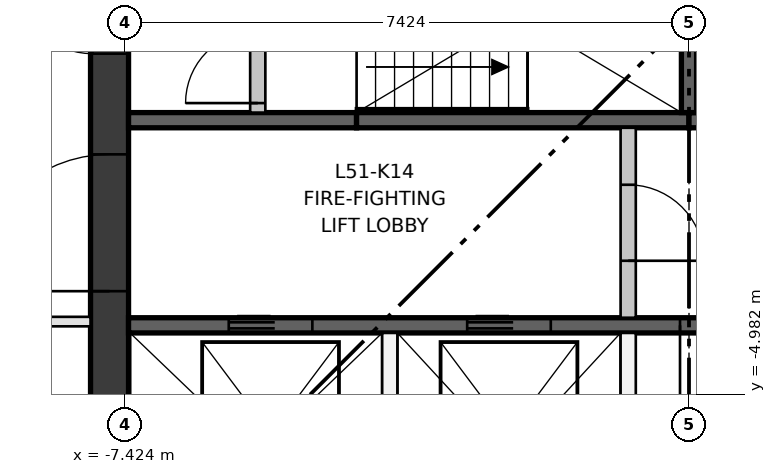
"""IFC4 building model, lengths in metres.
Left out: names, types, materials, properties, quantities, classifications, styles, units other than length and angle.
Written with IfcOpenShell. Run it as: python <this file> out.ifc"""

import sys

from ifc_helpers import new_model, si_unit, direction, frame, frame_2d, origin, place, context, subcontext, project, spatial, rectangle, extrude, element, fill, save


model = new_model("IFC4")
c1 = context("Model", 3, precision=1e-05, world=origin(), true_north=direction((0.0, 1.0)))
c2 = subcontext(c1, "Body", "Model", "MODEL_VIEW")
j1 = project(units=[si_unit("LENGTHUNIT", "METRE"), si_unit("PLANEANGLEUNIT", "RADIAN")], contexts=[c1])
p1 = place(None, origin())
s1 = spatial("IfcSite", under=j1, at=p1, CompositionType="ELEMENT")
p2 = place(p1, origin())
s2 = spatial("IfcBuilding", under=s1, at=p2, CompositionType="ELEMENT")
p3 = place(p2, frame((0.0, 0.0, 191.0)))
s3 = spatial("IfcBuildingStorey", under=s2, at=p3, CompositionType="ELEMENT", Elevation=191.0)
p4 = place(p3, frame((-7.624, -7.374, 0.0), z_axis=(0.0, 0.0, 1.0), x_axis=(0.0, 1.0, 0.0)))
e1 = element("IfcWall", 1, at=p4, inside=s3, PredefinedType="SHEAR", context=c2, shape_type="SweptSolid", body=[
    extrude(rectangle(XDim=14.748, YDim=0.5, at=frame_2d((7.374, 0.0))), origin(), (0.0, 0.0, 1.0), 3.35),
])
p5 = place(p4, frame((6.874, 0.0, 0.0)))
e2 = element("IfcOpeningElement", 2, at=p5, cuts=e1, PredefinedType="OPENING", context=c2, shape_type="SweptSolid", body=[
    extrude(rectangle(XDim=1.0, YDim=2.1, at=frame_2d((0.5, 1.05))), frame((0.0, 0.26, 0.0), z_axis=(0.0, -1.0, 0.0), x_axis=(1.0, 0.0, 0.0)), (0.0, 0.0, 1.0), 0.52),
])
p6 = place(p4, frame((3.75, 0.0, 0.0)))
e3 = element("IfcOpeningElement", 3, at=p6, cuts=e1, PredefinedType="OPENING", context=c2, shape_type="SweptSolid", body=[
    extrude(rectangle(XDim=1.8, YDim=2.1, at=frame_2d((0.9, 1.05))), frame((0.0, 0.26, 0.0), z_axis=(0.0, -1.0, 0.0), x_axis=(1.0, 0.0, 0.0)), (0.0, 0.0, 1.0), 0.52),
])
p7 = place(p4, frame((9.198, 0.0, 0.0)))
e4 = element("IfcOpeningElement", 4, at=p7, cuts=e1, PredefinedType="OPENING", context=c2, shape_type="SweptSolid", body=[
    extrude(rectangle(XDim=1.8, YDim=2.1, at=frame_2d((0.9, 1.05))), frame((0.0, 0.26, 0.0), z_axis=(0.0, -1.0, 0.0), x_axis=(1.0, 0.0, 0.0)), (0.0, 0.0, 1.0), 0.52),
])
p8 = place(p3, frame((-7.374, -4.074, 0.0), z_axis=(0.0, 0.0, 1.0), x_axis=(1.0, 0.0, 0.0)))
e5 = element("IfcWall", 5, at=p8, inside=s3, PredefinedType="SHEAR", context=c2, shape_type="SweptSolid", body=[
    extrude(rectangle(XDim=14.748, YDim=0.2, at=frame_2d((7.374, 0.0))), origin(), (0.0, 0.0, 1.0), 3.0),
])
p9 = place(p8, frame((1.319, 0.0, 0.0)))
e6 = element("IfcOpeningElement", 6, at=p9, cuts=e5, PredefinedType="OPENING", context=c2, shape_type="SweptSolid", body=[
    extrude(rectangle(XDim=1.1, YDim=2.1, at=frame_2d((0.55, 1.05))), frame((0.0, 0.11, 0.0), z_axis=(0.0, -1.0, 0.0), x_axis=(1.0, 0.0, 0.0)), (0.0, 0.0, 1.0), 0.22),
])
p10 = place(p8, frame((4.456, 0.0, 0.0)))
e7 = element("IfcOpeningElement", 7, at=p10, cuts=e5, PredefinedType="OPENING", context=c2, shape_type="SweptSolid", body=[
    extrude(rectangle(XDim=1.1, YDim=2.1, at=frame_2d((0.55, 1.05))), frame((0.0, 0.11, 0.0), z_axis=(0.0, -1.0, 0.0), x_axis=(1.0, 0.0, 0.0)), (0.0, 0.0, 1.0), 0.22),
])
p11 = place(p8, frame((7.256, 0.0, 0.0)))
e8 = element("IfcOpeningElement", 8, at=p11, cuts=e5, PredefinedType="OPENING", context=c2, shape_type="SweptSolid", body=[
    extrude(rectangle(XDim=1.0, YDim=2.1, at=frame_2d((0.5, 1.05))), frame((0.0, 0.11, 0.0), z_axis=(0.0, -1.0, 0.0), x_axis=(1.0, 0.0, 0.0)), (0.0, 0.0, 1.0), 0.22),
])
p12 = place(p8, frame((9.275, 0.0, 0.0)))
e9 = element("IfcOpeningElement", 9, at=p12, cuts=e5, PredefinedType="OPENING", context=c2, shape_type="SweptSolid", body=[
    extrude(rectangle(XDim=1.0, YDim=2.1, at=frame_2d((0.5, 1.05))), frame((0.0, 0.11, 0.0), z_axis=(0.0, -1.0, 0.0), x_axis=(1.0, 0.0, 0.0)), (0.0, 0.0, 1.0), 0.22),
])
p13 = place(p8, frame((10.95, 0.0, 0.0)))
e10 = element("IfcOpeningElement", 10, at=p13, cuts=e5, PredefinedType="OPENING", context=c2, shape_type="SweptSolid", body=[
    extrude(rectangle(XDim=1.0, YDim=2.1, at=frame_2d((0.5, 1.05))), frame((0.0, 0.11, 0.0), z_axis=(0.0, -1.0, 0.0), x_axis=(1.0, 0.0, 0.0)), (0.0, 0.0, 1.0), 0.22),
])
p14 = place(p8, frame((13.068, 0.0, 0.0)))
e11 = element("IfcOpeningElement", 11, at=p14, cuts=e5, PredefinedType="OPENING", context=c2, shape_type="SweptSolid", body=[
    extrude(rectangle(XDim=1.0, YDim=2.1, at=frame_2d((0.5, 1.05))), frame((0.0, 0.11, 0.0), z_axis=(0.0, -1.0, 0.0), x_axis=(1.0, 0.0, 0.0)), (0.0, 0.0, 1.0), 0.22),
])
p15 = place(p3, frame((-7.374, -1.375, 0.0), z_axis=(0.0, 0.0, 1.0), x_axis=(1.0, 0.0, 0.0)))
e12 = element("IfcWall", 12, at=p15, inside=s3, PredefinedType="SHEAR", context=c2, shape_type="SweptSolid", body=[
    extrude(rectangle(XDim=3.0, YDim=0.2, at=frame_2d((1.5, 0.0))), origin(), (0.0, 0.0, 1.0), 3.0),
])
for number, where, z_axis, x_axis in (
    (13, (-4.374, -1.375, 0.0), (0.0, 0.0, 1.0), (1.0, 0.0, 0.0)),
    (14, (0.0, -1.375, 0.0), (0.0, 0.0, 1.0), (1.0, 0.0, 0.0)),
):
    element("IfcWall", number, at=place(p3, frame(where, z_axis=z_axis, x_axis=x_axis)), inside=s3, PredefinedType="SHEAR", context=c2, shape_type="SweptSolid", body=[
        extrude(rectangle(XDim=4.374, YDim=0.2, at=frame_2d((2.187, 0.0))), origin(), (0.0, 0.0, 1.0), 3.0),
    ])
p16 = place(p3, frame((0.0, -1.275, 0.0), z_axis=(0.0, 0.0, 1.0), x_axis=(0.0, 1.0, 0.0)))
e15 = element("IfcWall", 15, at=p16, inside=s3, PredefinedType="SHEAR", context=c2, shape_type="SweptSolid", body=[
    extrude(rectangle(XDim=2.55, YDim=0.2, at=frame_2d((1.275, 0.0))), origin(), (0.0, 0.0, 1.0), 3.0),
])
for number, where, z_axis, x_axis in (
    (16, (-3.937, -7.374, 0.0), (0.0, 0.0, 1.0), (0.0, 1.0, 0.0)),
    (17, (-0.8, -7.374, 0.0), (0.0, 0.0, 1.0), (0.0, 1.0, 0.0)),
):
    element("IfcWall", number, at=place(p3, frame(where, z_axis=z_axis, x_axis=x_axis)), inside=s3, PredefinedType="PARTITIONING", context=c2, shape_type="SweptSolid", body=[
        extrude(rectangle(XDim=3.2, YDim=0.2, at=frame_2d((1.6, 0.0))), origin(), (0.0, 0.0, 1.0), 3.0),
    ])
p17 = place(p3, frame((-0.8, -3.974, 0.0), z_axis=(0.0, 0.0, 1.0), x_axis=(0.0, 1.0, 0.0)))
e18 = element("IfcWall", 18, at=p17, inside=s3, PredefinedType="PARTITIONING", context=c2, shape_type="SweptSolid", body=[
    extrude(rectangle(XDim=2.499, YDim=0.2, at=frame_2d((1.25, 0.0))), origin(), (0.0, 0.0, 1.0), 3.0),
])
p18 = place(p17, frame((0.75, 0.0, 0.0)))
e19 = element("IfcOpeningElement", 19, at=p18, cuts=e18, PredefinedType="OPENING", context=c2, shape_type="SweptSolid", body=[
    extrude(rectangle(XDim=1.0, YDim=2.1, at=frame_2d((0.5, 1.05))), frame((0.0, 0.11, 0.0), z_axis=(0.0, -1.0, 0.0), x_axis=(1.0, 0.0, 0.0)), (0.0, 0.0, 1.0), 0.22),
])
p19 = place(p3, frame((-5.674, -1.275, 0.0), z_axis=(0.0, 0.0, 1.0), x_axis=(0.0, 1.0, 0.0)))
e20 = element("IfcWall", 20, at=p19, inside=s3, PredefinedType="PARTITIONING", context=c2, shape_type="SweptSolid", body=[
    extrude(rectangle(XDim=2.55, YDim=0.2, at=frame_2d((1.275, 0.0))), origin(), (0.0, 0.0, 1.0), 3.0),
])
p20 = place(p19, frame((0.125, 0.0, 0.0)))
e21 = element("IfcOpeningElement", 21, at=p20, cuts=e20, PredefinedType="OPENING", context=c2, shape_type="SweptSolid", body=[
    extrude(rectangle(XDim=0.95, YDim=2.1, at=frame_2d((0.475, 1.05))), frame((0.0, 0.11, 0.0), z_axis=(0.0, -1.0, 0.0), x_axis=(1.0, 0.0, 0.0)), (0.0, 0.0, 1.0), 0.22),
])
p21 = place(p19, frame((1.475, 0.0, 0.0)))
e22 = element("IfcOpeningElement", 22, at=p21, cuts=e20, PredefinedType="OPENING", context=c2, shape_type="SweptSolid", body=[
    extrude(rectangle(XDim=0.95, YDim=2.1, at=frame_2d((0.475, 1.05))), frame((0.0, 0.11, 0.0), z_axis=(0.0, -1.0, 0.0), x_axis=(1.0, 0.0, 0.0)), (0.0, 0.0, 1.0), 0.22),
])
p22 = place(p3, frame((-7.874, -4.024, 0.0), z_axis=(0.0, 0.0, 1.0), x_axis=(-1.0, 0.0, 0.0)))
e23 = element("IfcWall", 23, at=p22, inside=s3, PredefinedType="PARTITIONING", context=c2, shape_type="SweptSolid", body=[
    extrude(rectangle(XDim=3.213, YDim=0.125, at=frame_2d((1.606, 0.0))), origin(), (0.0, 0.0, 1.0), 3.0),
])
p23 = place(p22, frame((1.1, 0.0, 0.0)))
e24 = element("IfcOpeningElement", 24, at=p23, cuts=e23, PredefinedType="OPENING", context=c2, shape_type="SweptSolid", body=[
    extrude(rectangle(XDim=1.0, YDim=2.1, at=frame_2d((0.5, 1.05))), frame((0.0, 0.073, 0.0), z_axis=(0.0, -1.0, 0.0), x_axis=(1.0, 0.0, 0.0)), (0.0, 0.0, 1.0), 0.145),
])
p24 = place(p9, origin())
e25 = element("IfcDoor", 25, at=p24, inside=s3, OperationType="DOUBLE_DOOR_SLIDING", PredefinedType="DOOR", context=c2, shape_type="SweptSolid", body=[
    extrude(rectangle(XDim=1.1, YDim=2.1, at=frame_2d((0.55, 1.05))), frame((0.0, 0.025, 0.0), z_axis=(0.0, -1.0, 0.0), x_axis=(1.0, 0.0, 0.0)), (0.0, 0.0, 1.0), 0.05),
])
fill(e6, e25)
p25 = place(p10, origin())
e26 = element("IfcDoor", 26, at=p25, inside=s3, OperationType="DOUBLE_DOOR_SLIDING", PredefinedType="DOOR", context=c2, shape_type="SweptSolid", body=[
    extrude(rectangle(XDim=1.1, YDim=2.1, at=frame_2d((0.55, 1.05))), frame((0.0, 0.025, 0.0), z_axis=(0.0, -1.0, 0.0), x_axis=(1.0, 0.0, 0.0)), (0.0, 0.0, 1.0), 0.05),
])
fill(e7, e26)
p26 = place(p20, origin())
e27 = element("IfcDoor", 27, at=p26, inside=s3, OperationType="SINGLE_SWING_LEFT", PredefinedType="DOOR", context=c2, shape_type="SweptSolid", body=[
    extrude(rectangle(XDim=0.95, YDim=2.1, at=frame_2d((0.475, 1.05))), frame((0.0, 0.025, 0.0), z_axis=(0.0, -1.0, 0.0), x_axis=(1.0, 0.0, 0.0)), (0.0, 0.0, 1.0), 0.05),
])
fill(e21, e27)
p27 = place(p18, frame((1.0, 0.0, 0.0), z_axis=(0.0, 0.0, 1.0), x_axis=(-1.0, 0.0, 0.0)))
e28 = element("IfcDoor", 28, at=p27, inside=s3, OperationType="SINGLE_SWING_LEFT", PredefinedType="DOOR", context=c2, shape_type="SweptSolid", body=[
    extrude(rectangle(XDim=1.0, YDim=2.1, at=frame_2d((0.5, 1.05))), frame((0.0, 0.025, 0.0), z_axis=(0.0, -1.0, 0.0), x_axis=(1.0, 0.0, 0.0)), (0.0, 0.0, 1.0), 0.05),
])
fill(e19, e28)
p28 = place(p11, frame((1.0, 0.0, 0.0), z_axis=(0.0, 0.0, 1.0), x_axis=(-1.0, 0.0, 0.0)))
e29 = element("IfcDoor", 29, at=p28, inside=s3, OperationType="SINGLE_SWING_LEFT", PredefinedType="DOOR", context=c2, shape_type="SweptSolid", body=[
    extrude(rectangle(XDim=1.0, YDim=2.1, at=frame_2d((0.5, 1.05))), frame((0.0, 0.025, 0.0), z_axis=(0.0, -1.0, 0.0), x_axis=(1.0, 0.0, 0.0)), (0.0, 0.0, 1.0), 0.05),
])
fill(e8, e29)
p29 = place(p5, origin())
e30 = element("IfcDoor", 30, at=p29, inside=s3, OperationType="SINGLE_SWING_RIGHT", PredefinedType="DOOR", context=c2, shape_type="SweptSolid", body=[
    extrude(rectangle(XDim=1.0, YDim=2.1, at=frame_2d((0.5, 1.05))), frame((0.0, 0.25, 0.0), z_axis=(0.0, -1.0, 0.0), x_axis=(1.0, 0.0, 0.0)), (0.0, 0.0, 1.0), 0.05),
])
fill(e2, e30)
p30 = place(p6, origin())
e31 = element("IfcDoor", 31, at=p30, inside=s3, OperationType="DOUBLE_DOOR_SINGLE_SWING", PredefinedType="DOOR", context=c2, shape_type="SweptSolid", body=[
    extrude(rectangle(XDim=1.8, YDim=2.1, at=frame_2d((0.9, 1.05))), frame((0.0, 0.025, 0.0), z_axis=(0.0, -1.0, 0.0), x_axis=(1.0, 0.0, 0.0)), (0.0, 0.0, 1.0), 0.05),
])
fill(e3, e31)
save(model, sys.argv[1])
